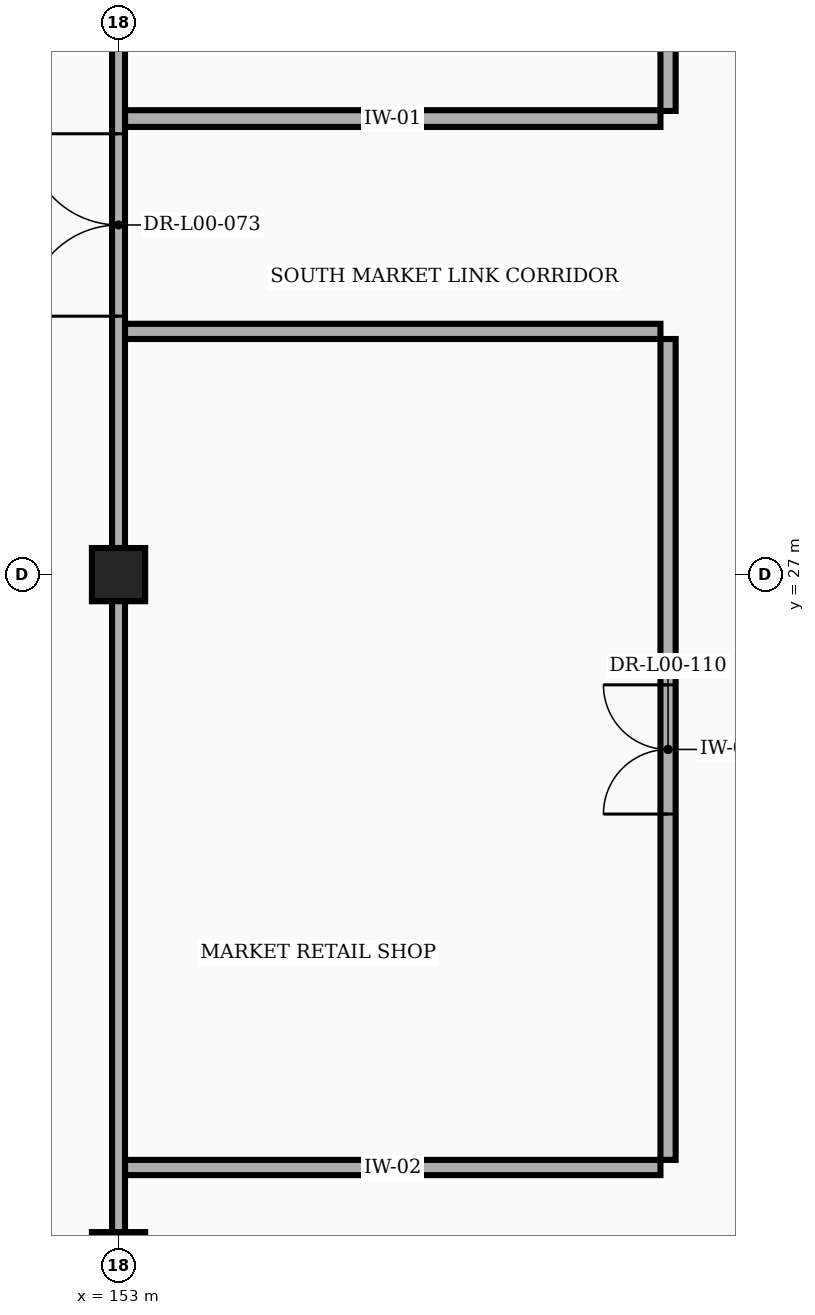
"""IFC4 building model, lengths in metres.
Left out: names, types, materials, properties, quantities, classifications, styles, units other than length and angle.
Written with IfcOpenShell. Run it as: python <this file> out.ifc"""

import sys

from ifc_helpers import new_model, si_unit, direction, frame, frame_2d, origin, origin_2d, place, context, subcontext, project, spatial, rectangle, extrude, element, fill, save


model = new_model("IFC4")
c1 = context("Model", 3, precision=1e-05, world=origin(), true_north=direction((0.0, 1.0)))
c2 = subcontext(c1, "Body", "Model", "MODEL_VIEW")
j1 = project(units=[si_unit("LENGTHUNIT", "METRE"), si_unit("PLANEANGLEUNIT", "RADIAN")], contexts=[c1])
p1 = place(None, origin())
s1 = spatial("IfcSite", under=j1, at=p1, CompositionType="ELEMENT")
p2 = place(p1, origin())
s2 = spatial("IfcBuilding", under=s1, at=p2, CompositionType="ELEMENT")
p3 = place(p2, origin())
s3 = spatial("IfcBuildingStorey", under=s2, at=p3, CompositionType="ELEMENT", Elevation=0.0)
for number, where, z_axis, x_axis in (
    (1, (153.0, 18.0, 0.0), (0.0, 0.0, 1.0), (1.0, 0.0, 0.0)),
    (2, (153.0, 27.0, 0.0), (0.0, 0.0, 1.0), (1.0, 0.0, 0.0)),
):
    element("IfcColumn", number, at=place(p3, frame(where, z_axis=z_axis, x_axis=x_axis)), inside=s3, PredefinedType="COLUMN", context=c2, shape_type="SweptSolid", body=[
        extrude(rectangle(XDim=0.7, YDim=0.7, at=origin_2d()), origin(), (0.0, 0.0, 1.0), 6.0),
    ])
for number, where, z_axis, x_axis in (
    (3, (153.085, 19.2, 0.0), (0.0, 0.0, 1.0), (1.0, 0.0, 0.0)),
    (4, (153.085, 30.2, 0.0), (0.0, 0.0, 1.0), (1.0, 0.0, 0.0)),
):
    element("IfcWall", number, at=place(p3, frame(where, z_axis=z_axis, x_axis=x_axis)), inside=s3, PredefinedType="PARTITIONING", context=c2, shape_type="SweptSolid", body=[
        extrude(rectangle(XDim=7.045, YDim=0.2, at=frame_2d((3.522, 0.0))), origin(), (0.0, 0.0, 1.0), 5.75),
    ])
p4 = place(p3, frame((153.085, 33.0, 0.0), z_axis=(0.0, 0.0, 1.0), x_axis=(1.0, 0.0, 0.0)))
e5 = element("IfcWall", 5, at=p4, inside=s3, PredefinedType="PARTITIONING", context=c2, shape_type="SweptSolid", body=[
    extrude(rectangle(XDim=7.045, YDim=0.22, at=frame_2d((3.522, 0.0))), origin(), (0.0, 0.0, 1.0), 5.75),
])
p5 = place(p3, frame((153.0, 18.22, 0.0), z_axis=(0.0, 0.0, 1.0), x_axis=(0.0, 1.0, 0.0)))
e6 = element("IfcWall", 6, at=p5, inside=s3, PredefinedType="PARTITIONING", context=c2, shape_type="SweptSolid", body=[
    extrude(rectangle(XDim=8.56, YDim=0.17, at=frame_2d((4.28, 0.0))), origin(), (0.0, 0.0, 1.0), 5.217),
])
p6 = place(p3, frame((153.0, 27.22, 0.0), z_axis=(0.0, 0.0, 1.0), x_axis=(0.0, 1.0, 0.0)))
e7 = element("IfcWall", 7, at=p6, inside=s3, PredefinedType="PARTITIONING", context=c2, shape_type="SweptSolid", body=[
    extrude(rectangle(XDim=8.56, YDim=0.17, at=frame_2d((4.28, 0.0))), origin(), (0.0, 0.0, 1.0), 5.217),
])
p7 = place(p6, frame((3.18, 0.0, 0.0)))
e8 = element("IfcOpeningElement", 8, at=p7, cuts=e7, PredefinedType="OPENING", context=c2, shape_type="SweptSolid", body=[
    extrude(rectangle(XDim=2.4, YDim=2.2, at=frame_2d((1.2, 1.1))), frame((0.0, 0.097, 0.0), z_axis=(0.0, -1.0, 0.0), x_axis=(1.0, 0.0, 0.0)), (0.0, 0.0, 1.0), 0.194),
])
p8 = place(p3, frame((160.23, 19.3, 0.0), z_axis=(0.0, 0.0, 1.0), x_axis=(0.0, 1.0, 0.0)))
e9 = element("IfcWall", 9, at=p8, inside=s3, PredefinedType="PARTITIONING", context=c2, shape_type="SweptSolid", body=[
    extrude(rectangle(XDim=10.8, YDim=0.2, at=frame_2d((5.4, 0.0))), origin(), (0.0, 0.0, 1.0), 5.75),
])
p9 = place(p8, frame((4.55, 0.0, 0.0)))
e10 = element("IfcOpeningElement", 10, at=p9, cuts=e9, PredefinedType="OPENING", context=c2, shape_type="SweptSolid", body=[
    extrude(rectangle(XDim=1.7, YDim=2.3, at=frame_2d((0.85, 1.15))), frame((0.0, 0.112, 0.0), z_axis=(0.0, -1.0, 0.0), x_axis=(1.0, 0.0, 0.0)), (0.0, 0.0, 1.0), 0.224),
])
p10 = place(p3, frame((160.23, 33.1, 0.0), z_axis=(0.0, 0.0, 1.0), x_axis=(0.0, 1.0, 0.0)))
e11 = element("IfcWall", 11, at=p10, inside=s3, PredefinedType="PARTITIONING", context=c2, shape_type="SweptSolid", body=[
    extrude(rectangle(XDim=5.94, YDim=0.2, at=frame_2d((2.97, 0.0))), origin(), (0.0, 0.0, 1.0), 5.75),
])
p11 = place(p10, frame((2.35, 0.0, 0.0)))
e12 = element("IfcOpeningElement", 12, at=p11, cuts=e11, PredefinedType="OPENING", context=c2, shape_type="SweptSolid", body=[
    extrude(rectangle(XDim=1.15, YDim=2.15, at=frame_2d((0.575, 1.075))), frame((0.0, 0.112, 0.0), z_axis=(0.0, -1.0, 0.0), x_axis=(1.0, 0.0, 0.0)), (0.0, 0.0, 1.0), 0.224),
])
p12 = place(p7, origin())
e13 = element("IfcDoor", 13, at=p12, inside=s3, OperationType="DOUBLE_DOOR_SINGLE_SWING", PredefinedType="DOOR", context=c2, shape_type="SweptSolid", body=[
    extrude(rectangle(XDim=2.4, YDim=2.2, at=frame_2d((1.2, 1.1))), frame((0.0, 0.025, 0.0), z_axis=(0.0, -1.0, 0.0), x_axis=(1.0, 0.0, 0.0)), (0.0, 0.0, 1.0), 0.05),
])
fill(e8, e13)
p13 = place(p9, origin())
e14 = element("IfcDoor", 14, at=p13, inside=s3, OperationType="DOUBLE_DOOR_SINGLE_SWING", PredefinedType="DOOR", context=c2, shape_type="SweptSolid", body=[
    extrude(rectangle(XDim=1.7, YDim=2.3, at=frame_2d((0.85, 1.15))), frame((0.0, 0.025, 0.0), z_axis=(0.0, -1.0, 0.0), x_axis=(1.0, 0.0, 0.0)), (0.0, 0.0, 1.0), 0.05),
])
fill(e10, e14)
save(model, sys.argv[1])
